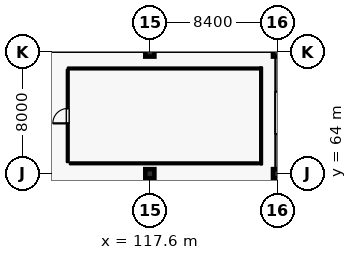
"""IFC4 building model, lengths in metres.
Left out: names, types, materials, properties, quantities, classifications, styles, units other than length and angle.
Written with IfcOpenShell. Run it as: python <this file> out.ifc"""

import sys

from ifc_helpers import new_model, si_unit, direction, frame, frame_2d, origin, origin_2d, place, context, subcontext, project, spatial, rectangle, extrude, element, fill, save


model = new_model("IFC4")
c1 = context("Model", 3, precision=1e-05, world=origin(), true_north=direction((0.0, 1.0)))
c2 = subcontext(c1, "Body", "Model", "MODEL_VIEW")
j1 = project(units=[si_unit("LENGTHUNIT", "METRE"), si_unit("PLANEANGLEUNIT", "RADIAN")], contexts=[c1])
p1 = place(None, origin())
s1 = spatial("IfcSite", under=j1, at=p1, CompositionType="ELEMENT")
p2 = place(p1, origin())
s2 = spatial("IfcBuilding", under=s1, at=p2, CompositionType="ELEMENT")
p3 = place(p2, frame((0.0, 0.0, 16.2)))
s3 = spatial("IfcBuildingStorey", under=s2, at=p3, CompositionType="ELEMENT", Elevation=16.2)
for number, where, z_axis, x_axis in (
    (1, (117.6, 64.0, 0.0), (0.0, 0.0, 1.0), (1.0, 0.0, 0.0)),
    (2, (117.6, 72.0, 0.0), (0.0, 0.0, 1.0), (1.0, 0.0, 0.0)),
    (3, (126.0, 64.0, 0.0), (0.0, 0.0, 1.0), (1.0, 0.0, 0.0)),
    (4, (126.0, 72.0, 0.0), (0.0, 0.0, 1.0), (1.0, 0.0, 0.0)),
):
    element("IfcColumn", number, at=place(p3, frame(where, z_axis=z_axis, x_axis=x_axis)), inside=s3, PredefinedType="COLUMN", context=c2, shape_type="SweptSolid", body=[
        extrude(rectangle(XDim=0.6, YDim=0.6, at=origin_2d()), origin(), (0.0, 0.0, 1.0), 4.8),
    ])
p4 = place(p3, frame((126.0, 71.7, 0.0), z_axis=(0.0, 0.0, 1.0), x_axis=(0.0, -1.0, 0.0)))
e5 = element("IfcWall", 5, at=p4, inside=s3, PredefinedType="SOLIDWALL", context=c2, shape_type="SweptSolid", body=[
    extrude(rectangle(XDim=7.4, YDim=0.28, at=frame_2d((3.7, 0.0))), origin(), (0.0, 0.0, 1.0), 3.84),
])
p5 = place(p4, frame((2.3, 0.0, 1.0)))
e6 = element("IfcOpeningElement", 6, at=p5, cuts=e5, PredefinedType="OPENING", context=c2, shape_type="SweptSolid", body=[
    extrude(rectangle(XDim=2.8, YDim=1.95, at=frame_2d((1.4, 0.975))), frame((0.0, 0.15, 0.0), z_axis=(0.0, -1.0, 0.0), x_axis=(1.0, 0.0, 0.0)), (0.0, 0.0, 1.0), 0.3),
])
p6 = place(p3, frame((126.0, 63.7, 0.0), z_axis=(0.0, 0.0, 1.0), x_axis=(0.0, -1.0, 0.0)))
e7 = element("IfcWall", 7, at=p6, inside=s3, PredefinedType="SOLIDWALL", context=c2, shape_type="SweptSolid", body=[
    extrude(rectangle(XDim=7.4, YDim=0.28, at=frame_2d((3.7, 0.0))), origin(), (0.0, 0.0, 1.0), 4.5),
])
p7 = place(p6, frame((2.2, 0.0, 1.0)))
e8 = element("IfcOpeningElement", 8, at=p7, cuts=e7, PredefinedType="OPENING", context=c2, shape_type="SweptSolid", body=[
    extrude(rectangle(XDim=3.0, YDim=2.2, at=frame_2d((1.5, 1.1))), frame((0.0, 0.15, 0.0), z_axis=(0.0, -1.0, 0.0), x_axis=(1.0, 0.0, 0.0)), (0.0, 0.0, 1.0), 0.3),
])
p8 = place(p3, frame((112.2, 64.76, 0.0), z_axis=(0.0, 0.0, 1.0), x_axis=(0.0, 1.0, 0.0)))
e9 = element("IfcWall", 9, at=p8, inside=s3, PredefinedType="PARTITIONING", context=c2, shape_type="SweptSolid", body=[
    extrude(rectangle(XDim=6.08, YDim=0.125, at=frame_2d((3.04, 0.0))), origin(), (0.0, 0.0, 1.0), 4.535),
])
p9 = place(p8, frame((2.55, 0.0, 0.0)))
e10 = element("IfcOpeningElement", 10, at=p9, cuts=e9, PredefinedType="OPENING", context=c2, shape_type="SweptSolid", body=[
    extrude(rectangle(XDim=0.98, YDim=2.15, at=frame_2d((0.49, 1.075))), frame((0.0, 0.073, 0.0), z_axis=(0.0, -1.0, 0.0), x_axis=(1.0, 0.0, 0.0)), (0.0, 0.0, 1.0), 0.145),
])
p10 = place(p3, frame((112.34, 64.68, 0.0), z_axis=(0.0, 0.0, 1.0), x_axis=(1.0, 0.0, 0.0)))
e11 = element("IfcWall", 11, at=p10, inside=s3, PredefinedType="PARTITIONING", context=c2, shape_type="SweptSolid", body=[
    extrude(rectangle(XDim=12.41, YDim=0.125, at=frame_2d((6.205, 0.0))), origin(), (0.0, 0.0, 1.0), 4.535),
])
p11 = place(p3, frame((124.92, 64.6, 0.0), z_axis=(0.0, 0.0, 1.0), x_axis=(0.0, 1.0, 0.0)))
e12 = element("IfcWall", 12, at=p11, inside=s3, PredefinedType="PARTITIONING", context=c2, shape_type="SweptSolid", body=[
    extrude(rectangle(XDim=6.4, YDim=0.125, at=frame_2d((3.2, 0.0))), origin(), (0.0, 0.0, 1.0), 4.535),
])
p12 = place(p3, frame((112.204, 70.92, 0.0), z_axis=(0.0, 0.0, 1.0), x_axis=(1.0, 0.0, 0.0)))
e13 = element("IfcWall", 13, at=p12, inside=s3, PredefinedType="PARTITIONING", context=c2, shape_type="SweptSolid", body=[
    extrude(rectangle(XDim=12.654, YDim=0.125, at=frame_2d((6.327, 0.0))), origin(), (0.0, 0.0, 1.0), 4.535),
])
p13 = place(p5, origin())
e14 = element("IfcWindow", 14, at=p13, inside=s3, PartitioningType="DOUBLE_PANEL_VERTICAL", PredefinedType="WINDOW", context=c2, shape_type="SweptSolid", body=[
    extrude(rectangle(XDim=2.8, YDim=1.95, at=frame_2d((1.4, 0.975))), frame((0.0, 0.03, 0.0), z_axis=(0.0, -1.0, 0.0), x_axis=(1.0, 0.0, 0.0)), (0.0, 0.0, 1.0), 0.06),
])
fill(e6, e14)
p14 = place(p9, origin())
e15 = element("IfcDoor", 15, at=p14, inside=s3, OperationType="SINGLE_SWING_LEFT", PredefinedType="DOOR", context=c2, shape_type="SweptSolid", body=[
    extrude(rectangle(XDim=0.98, YDim=2.15, at=frame_2d((0.49, 1.075))), frame((0.0, 0.025, 0.0), z_axis=(0.0, -1.0, 0.0), x_axis=(1.0, 0.0, 0.0)), (0.0, 0.0, 1.0), 0.05),
])
fill(e10, e15)
save(model, sys.argv[1])
